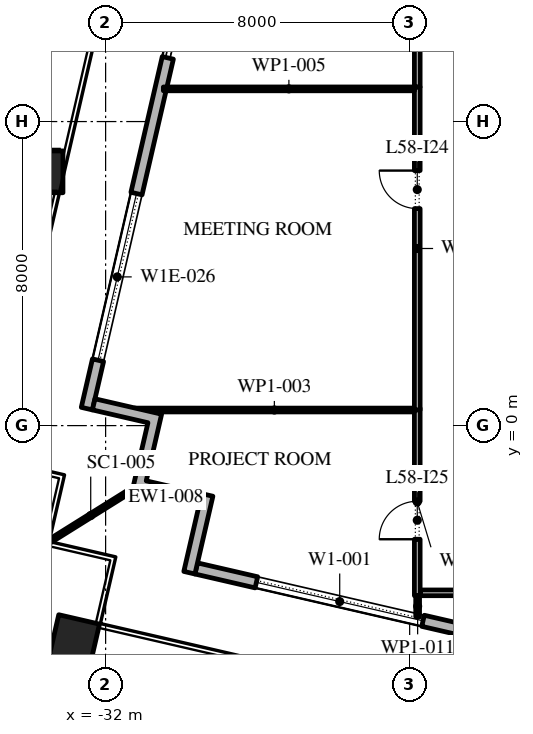
"""IFC4 building model, lengths in metres.
Left out: names, types, materials, properties, quantities, classifications, styles, units other than length and angle.
Written with IfcOpenShell. Run it as: python <this file> out.ifc"""

import sys

from ifc_helpers import new_model, si_unit, direction, frame, frame_2d, origin, origin_2d, place, context, subcontext, project, spatial, polyline, rectangle, outline, extrude, element, fill, save


model = new_model("IFC4")
c1 = context("Model", 3, precision=1e-05, world=origin(), true_north=direction((0.0, 1.0)))
c2 = subcontext(c1, "Body", "Model", "MODEL_VIEW")
j1 = project(units=[si_unit("LENGTHUNIT", "METRE"), si_unit("PLANEANGLEUNIT", "RADIAN")], contexts=[c1])
p1 = place(None, origin())
s1 = spatial("IfcSite", under=j1, at=p1, CompositionType="ELEMENT")
p2 = place(p1, origin())
s2 = spatial("IfcBuilding", under=s1, at=p2, CompositionType="ELEMENT")
p3 = place(p2, frame((0.0, 0.0, 268.2)))
s3 = spatial("IfcBuildingStorey", under=s2, at=p3, CompositionType="ELEMENT", Elevation=268.2)
p4 = place(p3, frame((-32.821, -5.635, 0.0), z_axis=(0.0, 0.0, 1.0), x_axis=(0.974370064785, -0.224951054344, 0.0)))
e1 = element("IfcColumn", 1, at=p4, inside=s3, PredefinedType="COLUMN", context=c2, shape_type="SweptSolid", body=[
    extrude(rectangle(XDim=1.1, YDim=1.1, at=origin_2d()), origin(), (0.0, 0.0, 1.0), 4.2),
])
p5 = place(p3, frame((-33.673, 6.677, 0.0), z_axis=(0.002906226325, 0.012613022249, 0.99991622925), x_axis=(-0.974466825284, 0.224531526563, 0.0)))
e2 = element("IfcColumn", 2, at=p5, inside=s3, PredefinedType="COLUMN", context=c2, shape_type="SweptSolid", body=[
    extrude(rectangle(XDim=1.1, YDim=1.1, at=origin_2d()), origin(), (0.0, 0.0, 1.0), 4.2),
])
p6 = place(p3, frame((-29.616, -3.758, 0.0), z_axis=(0.0, 0.0, 1.0), x_axis=(0.974370532314, -0.224949029246, 0.0)))
e3 = element("IfcWall", 3, at=p6, inside=s3, PredefinedType="STANDARD", context=c2, shape_type="SweptSolid", body=[
    extrude(rectangle(XDim=48.0, YDim=0.3, at=frame_2d((24.0, 0.0))), origin(), (0.0, 0.0, 1.0), 4.0),
])
p7 = place(p6, frame((1.625, 0.0, 0.45)))
e4 = element("IfcOpeningElement", 4, at=p7, cuts=e3, PredefinedType="OPENING", context=c2, shape_type="SweptSolid", body=[
    extrude(rectangle(XDim=4.5, YDim=3.05, at=frame_2d((2.25, 1.525))), frame((0.0, 0.16, 0.0), z_axis=(0.0, -1.0, 0.0), x_axis=(1.0, 0.0, 0.0)), (0.0, 0.0, 1.0), 0.32),
])
p8 = place(p6, frame((10.575, 0.0, 0.0)))
e5 = element("IfcOpeningElement", 5, at=p8, cuts=e3, PredefinedType="OPENING", context=c2, shape_type="SweptSolid", body=[
    extrude(rectangle(XDim=2.4, YDim=3.5, at=frame_2d((1.2, 1.75))), frame((0.0, 0.16, 0.0), z_axis=(0.0, -1.0, 0.0), x_axis=(1.0, 0.0, 0.0)), (0.0, 0.0, 1.0), 0.32),
])
p9 = place(p6, frame((17.575, 0.0, 0.45)))
e6 = element("IfcOpeningElement", 6, at=p9, cuts=e3, PredefinedType="OPENING", context=c2, shape_type="SweptSolid", body=[
    extrude(rectangle(XDim=4.5, YDim=3.0, at=frame_2d((2.25, 1.5))), frame((0.0, 0.16, 0.0), z_axis=(0.0, -1.0, 0.0), x_axis=(1.0, 0.0, 0.0)), (0.0, 0.0, 1.0), 0.32),
])
p10 = place(p6, frame((25.625, 0.0, 0.45)))
e7 = element("IfcOpeningElement", 7, at=p10, cuts=e3, PredefinedType="OPENING", context=c2, shape_type="SweptSolid", body=[
    extrude(rectangle(XDim=4.5, YDim=2.95, at=frame_2d((2.25, 1.475))), frame((0.0, 0.16, 0.0), z_axis=(0.0, -1.0, 0.0), x_axis=(1.0, 0.0, 0.0)), (0.0, 0.0, 1.0), 0.32),
])
p11 = place(p6, frame((33.675, 0.0, 0.45)))
e8 = element("IfcOpeningElement", 8, at=p11, cuts=e3, PredefinedType="OPENING", context=c2, shape_type="SweptSolid", body=[
    extrude(rectangle(XDim=4.5, YDim=2.825, at=frame_2d((2.25, 1.413))), frame((0.0, 0.16, 0.0), z_axis=(0.0, -1.0, 0.0), x_axis=(1.0, 0.0, 0.0)), (0.0, 0.0, 1.0), 0.32),
])
p12 = place(p6, frame((42.175, 0.0, 0.0)))
e9 = element("IfcOpeningElement", 9, at=p12, cuts=e3, PredefinedType="OPENING", context=c2, shape_type="SweptSolid", body=[
    extrude(rectangle(XDim=2.4, YDim=3.5, at=frame_2d((1.2, 1.75))), frame((0.0, 0.16, 0.0), z_axis=(0.0, -1.0, 0.0), x_axis=(1.0, 0.0, 0.0)), (0.0, 0.0, 1.0), 0.32),
])
p13 = place(p3, frame((-21.359, 48.678, 0.0), z_axis=(0.0, 0.0, 1.0), x_axis=(-0.224949198343, -0.974370493275, 0.0)))
e10 = element("IfcWall", 10, at=p13, inside=s3, PredefinedType="STANDARD", context=c2, shape_type="SweptSolid", body=[
    extrude(rectangle(XDim=49.5, YDim=0.3, at=frame_2d((24.75, 0.0))), origin(), (0.0, 0.0, 1.0), 4.0),
])
p14 = place(p13, frame((1.157, 0.0, 0.45)))
e11 = element("IfcOpeningElement", 11, at=p14, cuts=e10, PredefinedType="OPENING", context=c2, shape_type="SweptSolid", body=[
    extrude(rectangle(XDim=4.5, YDim=3.05, at=frame_2d((2.25, 1.525))), frame((0.0, 0.16, 0.0), z_axis=(0.0, -1.0, 0.0), x_axis=(1.0, 0.0, 0.0)), (0.0, 0.0, 1.0), 0.32),
])
p15 = place(p13, frame((9.171, 0.0, 0.0)))
e12 = element("IfcOpeningElement", 12, at=p15, cuts=e10, PredefinedType="OPENING", context=c2, shape_type="SweptSolid", body=[
    extrude(rectangle(XDim=2.4, YDim=3.5, at=frame_2d((1.2, 1.75))), frame((0.0, 0.16, 0.0), z_axis=(0.0, -1.0, 0.0), x_axis=(1.0, 0.0, 0.0)), (0.0, 0.0, 1.0), 0.32),
])
p16 = place(p13, frame((15.236, 0.0, 0.45)))
e13 = element("IfcOpeningElement", 13, at=p16, cuts=e10, PredefinedType="OPENING", context=c2, shape_type="SweptSolid", body=[
    extrude(rectangle(XDim=4.5, YDim=3.05, at=frame_2d((2.25, 1.525))), frame((0.0, 0.16, 0.0), z_axis=(0.0, -1.0, 0.0), x_axis=(1.0, 0.0, 0.0)), (0.0, 0.0, 1.0), 0.32),
])
p17 = place(p13, frame((22.35, 0.0, 0.45)))
e14 = element("IfcOpeningElement", 14, at=p17, cuts=e10, PredefinedType="OPENING", context=c2, shape_type="SweptSolid", body=[
    extrude(rectangle(XDim=4.5, YDim=3.05, at=frame_2d((2.25, 1.525))), frame((0.0, 0.16, 0.0), z_axis=(0.0, -1.0, 0.0), x_axis=(1.0, 0.0, 0.0)), (0.0, 0.0, 1.0), 0.32),
])
p18 = place(p13, frame((29.464, 0.0, 0.45)))
e15 = element("IfcOpeningElement", 15, at=p18, cuts=e10, PredefinedType="OPENING", context=c2, shape_type="SweptSolid", body=[
    extrude(rectangle(XDim=4.5, YDim=3.05, at=frame_2d((2.25, 1.525))), frame((0.0, 0.16, 0.0), z_axis=(0.0, -1.0, 0.0), x_axis=(1.0, 0.0, 0.0)), (0.0, 0.0, 1.0), 0.32),
])
p19 = place(p13, frame((37.628, 0.0, 0.0)))
e16 = element("IfcOpeningElement", 16, at=p19, cuts=e10, PredefinedType="OPENING", context=c2, shape_type="SweptSolid", body=[
    extrude(rectangle(XDim=2.4, YDim=3.325, at=frame_2d((1.2, 1.663))), frame((0.0, 0.16, 0.0), z_axis=(0.0, -1.0, 0.0), x_axis=(1.0, 0.0, 0.0)), (0.0, 0.0, 1.0), 0.32),
])
p20 = place(p13, frame((43.693, 0.0, 0.45)))
e17 = element("IfcOpeningElement", 17, at=p20, cuts=e10, PredefinedType="OPENING", context=c2, shape_type="SweptSolid", body=[
    extrude(rectangle(XDim=4.5, YDim=2.825, at=frame_2d((2.25, 1.413))), frame((0.0, 0.16, 0.0), z_axis=(0.0, -1.0, 0.0), x_axis=(1.0, 0.0, 0.0)), (0.0, 0.0, 1.0), 0.32),
])
p21 = place(p3, origin())
e18 = element("IfcWall", 18, at=p21, inside=s3, PredefinedType="STANDARD", context=c2, shape_type="SweptSolid", body=[
    extrude(outline(polyline([(-31.291, -1.678), (-30.886, 0.076), (-32.348, 0.413), (-32.28, 0.705), (-30.526, 0.301), (-30.931, -1.453), (-29.177, -1.858), (-29.65, -3.905), (-29.942, -3.837), (-29.537, -2.083), (-31.291, -1.678)])), origin(), (0.0, 0.0, 1.0), 4.0),
])
p22 = place(p3, frame((-31.291, -1.678, -0.05), z_axis=(0.0, 0.0, 1.0), x_axis=(-0.84807753525, -0.529872148923, 0.0)))
e19 = element("IfcWall", 19, at=p22, inside=s3, PredefinedType="STANDARD", context=c2, shape_type="SweptSolid", body=[
    extrude(rectangle(XDim=2.596, YDim=0.1, at=frame_2d((1.298, 0.0))), origin(), (0.0, 0.0, 1.0), 4.05),
])
p23 = place(p3, frame((-23.8, -4.475, 0.0), z_axis=(0.0, 0.0, 1.0), x_axis=(0.0, 1.0, 0.0)))
e20 = element("IfcWall", 20, at=p23, inside=s3, PredefinedType="PARTITIONING", context=c2, shape_type="SweptSolid", body=[
    extrude(rectangle(XDim=4.935, YDim=0.15, at=frame_2d((2.468, 0.0))), origin(), (0.0, 0.0, 1.0), 4.0),
])
p24 = place(p23, frame((1.485, 0.0, 0.0)))
e21 = element("IfcOpeningElement", 21, at=p24, cuts=e20, PredefinedType="OPENING", context=c2, shape_type="SweptSolid", body=[
    extrude(rectangle(XDim=1.0, YDim=2.1, at=frame_2d((0.5, 1.05))), frame((0.0, 0.085, 0.0), z_axis=(0.0, -1.0, 0.0), x_axis=(1.0, 0.0, 0.0)), (0.0, 0.0, 1.0), 0.17),
])
p25 = place(p3, frame((-23.875, 0.41, 0.0), z_axis=(0.0, 0.0, 1.0), x_axis=(-1.0, 0.0, 0.0)))
e22 = element("IfcWall", 22, at=p25, inside=s3, PredefinedType="PARTITIONING", context=c2, shape_type="SweptSolid", body=[
    extrude(rectangle(XDim=7.37, YDim=0.1, at=frame_2d((3.685, 0.0))), origin(), (0.0, 0.0, 1.0), 4.0),
])
p26 = place(p3, frame((-23.8, 0.41, 0.0), z_axis=(0.0, 0.0, 1.0), x_axis=(0.0, 1.0, 0.0)))
e23 = element("IfcWall", 23, at=p26, inside=s3, PredefinedType="PARTITIONING", context=c2, shape_type="SweptSolid", body=[
    extrude(rectangle(XDim=8.5, YDim=0.15, at=frame_2d((4.25, 0.0))), origin(), (0.0, 0.0, 1.0), 4.0),
])
p27 = place(p26, frame((5.3, 0.0, 0.0)))
e24 = element("IfcOpeningElement", 24, at=p27, cuts=e23, PredefinedType="OPENING", context=c2, shape_type="SweptSolid", body=[
    extrude(rectangle(XDim=1.0, YDim=2.1, at=frame_2d((0.5, 1.05))), frame((0.0, 0.085, 0.0), z_axis=(0.0, -1.0, 0.0), x_axis=(1.0, 0.0, 0.0)), (0.0, 0.0, 1.0), 0.17),
])
p28 = place(p3, frame((-23.875, 8.86, 0.0), z_axis=(0.0, 0.0, 1.0), x_axis=(-1.0, 0.0, 0.0)))
e25 = element("IfcWall", 25, at=p28, inside=s3, PredefinedType="PARTITIONING", context=c2, shape_type="SweptSolid", body=[
    extrude(rectangle(XDim=6.605, YDim=0.1, at=frame_2d((3.302, 0.0))), origin(), (0.0, 0.0, 1.0), 4.0),
])
p29 = place(p3, frame((-23.8, 8.91, 0.0), z_axis=(0.0, 0.0, 1.0), x_axis=(0.0, 1.0, 0.0)))
e26 = element("IfcWall", 26, at=p29, inside=s3, PredefinedType="PARTITIONING", context=c2, shape_type="SweptSolid", body=[
    extrude(rectangle(XDim=6.88, YDim=0.15, at=frame_2d((3.44, 0.0))), origin(), (0.0, 0.0, 1.0), 4.0),
])
p30 = place(p29, frame((2.23, 0.0, 0.0)))
e27 = element("IfcOpeningElement", 27, at=p30, cuts=e26, PredefinedType="OPENING", context=c2, shape_type="SweptSolid", body=[
    extrude(rectangle(XDim=1.0, YDim=2.1, at=frame_2d((0.5, 1.05))), frame((0.0, 0.085, 0.0), z_axis=(0.0, -1.0, 0.0), x_axis=(1.0, 0.0, 0.0)), (0.0, 0.0, 1.0), 0.17),
])
p31 = place(p3, frame((-23.79, -5.032, 0.0), z_axis=(0.0, 0.0, 1.0), x_axis=(0.0, 1.0, 0.0)))
e28 = element("IfcWall", 28, at=p31, inside=s3, PredefinedType="PARTITIONING", context=c2, shape_type="SweptSolid", body=[
    extrude(rectangle(XDim=0.557, YDim=0.1, at=frame_2d((0.278, 0.0))), origin(), (0.0, 0.0, 1.0), 4.0),
])
p32 = place(p3, frame((-10.075, -4.4, 0.0), z_axis=(0.0, 0.0, 1.0), x_axis=(-1.0, 0.0, 0.0)))
e29 = element("IfcWall", 29, at=p32, inside=s3, PredefinedType="PARTITIONING", context=c2, shape_type="SweptSolid", body=[
    extrude(rectangle(XDim=13.64, YDim=0.15, at=frame_2d((6.82, 0.0))), origin(), (0.0, 0.0, 1.0), 4.0),
])
p33 = place(p32, frame((9.065, 0.0, 0.0)))
e30 = element("IfcOpeningElement", 30, at=p33, cuts=e29, PredefinedType="OPENING", context=c2, shape_type="SweptSolid", body=[
    extrude(rectangle(XDim=1.0, YDim=2.1, at=frame_2d((0.5, 1.05))), frame((0.0, 0.085, 0.0), z_axis=(0.0, -1.0, 0.0), x_axis=(1.0, 0.0, 0.0)), (0.0, 0.0, 1.0), 0.17),
])
p34 = place(p7, origin())
e31 = element("IfcWindow", 31, at=p34, inside=s3, PartitioningType="DOUBLE_PANEL_VERTICAL", PredefinedType="WINDOW", context=c2, shape_type="SweptSolid", body=[
    extrude(rectangle(XDim=4.5, YDim=3.05, at=frame_2d((2.25, 1.525))), frame((0.0, 0.03, 0.0), z_axis=(0.0, -1.0, 0.0), x_axis=(1.0, 0.0, 0.0)), (0.0, 0.0, 1.0), 0.06),
])
fill(e4, e31)
p35 = place(p19, origin())
e32 = element("IfcDoor", 32, at=p35, inside=s3, OperationType="DOUBLE_DOOR_SLIDING", PredefinedType="DOOR", context=c2, shape_type="SweptSolid", body=[
    extrude(rectangle(XDim=2.4, YDim=3.325, at=frame_2d((1.2, 1.663))), frame((0.0, 0.025, 0.0), z_axis=(0.0, -1.0, 0.0), x_axis=(1.0, 0.0, 0.0)), (0.0, 0.0, 1.0), 0.05),
])
fill(e16, e32)
p36 = place(p20, origin())
e33 = element("IfcWindow", 33, at=p36, inside=s3, PartitioningType="DOUBLE_PANEL_VERTICAL", PredefinedType="WINDOW", context=c2, shape_type="SweptSolid", body=[
    extrude(rectangle(XDim=4.5, YDim=2.825, at=frame_2d((2.25, 1.413))), frame((0.0, 0.03, 0.0), z_axis=(0.0, -1.0, 0.0), x_axis=(1.0, 0.0, 0.0)), (0.0, 0.0, 1.0), 0.06),
])
fill(e17, e33)
p37 = place(p27, origin())
e34 = element("IfcDoor", 34, at=p37, inside=s3, OperationType="SINGLE_SWING_LEFT", PredefinedType="DOOR", context=c2, shape_type="SweptSolid", body=[
    extrude(rectangle(XDim=1.0, YDim=2.1, at=frame_2d((0.5, 1.05))), frame((0.0, 0.025, 0.0), z_axis=(0.0, -1.0, 0.0), x_axis=(1.0, 0.0, 0.0)), (0.0, 0.0, 1.0), 0.05),
])
fill(e24, e34)
p38 = place(p24, origin())
e35 = element("IfcDoor", 35, at=p38, inside=s3, OperationType="SINGLE_SWING_RIGHT", PredefinedType="DOOR", context=c2, shape_type="SweptSolid", body=[
    extrude(rectangle(XDim=1.0, YDim=2.1, at=frame_2d((0.5, 1.05))), frame((0.0, 0.025, 0.0), z_axis=(0.0, -1.0, 0.0), x_axis=(1.0, 0.0, 0.0)), (0.0, 0.0, 1.0), 0.05),
])
fill(e21, e35)
save(model, sys.argv[1])
